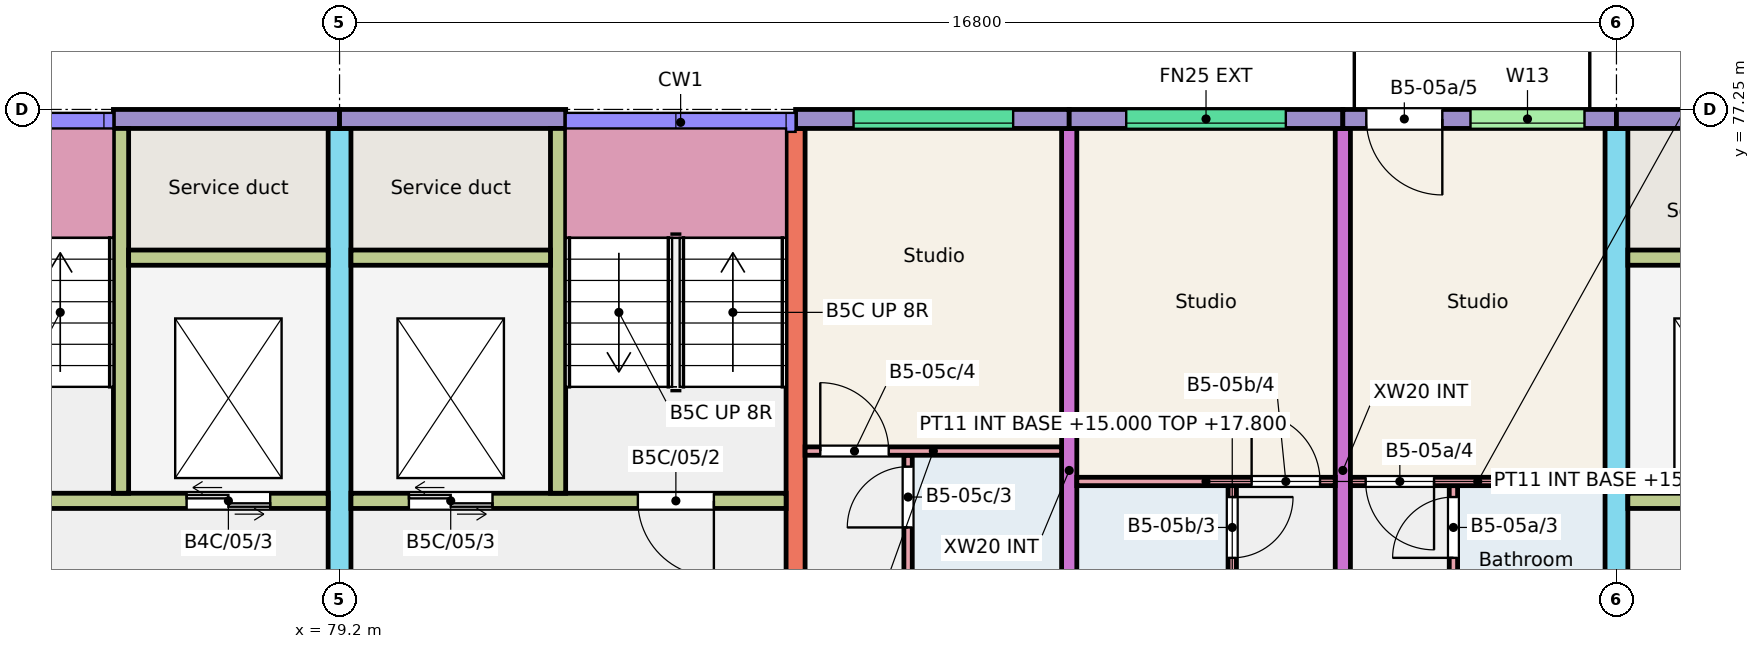
"""IFC4 building model, lengths in metres.
Left out: names, types, materials, properties, quantities, classifications, styles, units other than length and angle.
Written with IfcOpenShell. Run it as: python <this file> out.ifc"""

import sys

from ifc_helpers import new_model, si_unit, direction, frame, frame_2d, origin, place, context, subcontext, project, spatial, rectangle, extrude, element, fill, save


model = new_model("IFC4")
c1 = context("Model", 3, precision=1e-05, world=origin(), true_north=direction((0.0, 1.0)))
c2 = subcontext(c1, "Body", "Model", "MODEL_VIEW")
j1 = project(units=[si_unit("LENGTHUNIT", "METRE"), si_unit("PLANEANGLEUNIT", "RADIAN")], contexts=[c1])
p1 = place(None, origin())
s1 = spatial("IfcSite", under=j1, at=p1, CompositionType="ELEMENT")
p2 = place(p1, origin())
s2 = spatial("IfcBuilding", under=s1, at=p2, CompositionType="ELEMENT")
p3 = place(p2, frame((0.0, 0.0, 15.0)))
s3 = spatial("IfcBuildingStorey", under=s2, at=p3, CompositionType="ELEMENT", Elevation=15.0)
p4 = place(p3, frame((79.2, 66.0, 0.0), z_axis=(0.0, 0.0, 1.0), x_axis=(0.0, 1.0, 0.0)))
e1 = element("IfcWall", 1, at=p4, inside=s3, PredefinedType="SHEAR", context=c2, shape_type="SweptSolid", body=[
    extrude(rectangle(XDim=11.0, YDim=0.3, at=frame_2d((5.5, 0.0))), origin(), (0.0, 0.0, 1.0), 3.0),
])
p5 = place(p4, frame((0.3, 0.0, 0.0)))
e2 = element("IfcOpeningElement", 2, at=p5, cuts=e1, PredefinedType="OPENING", context=c2, shape_type="SweptSolid", body=[
    extrude(rectangle(XDim=1.2, YDim=2.1, at=frame_2d((0.6, 1.05))), frame((0.0, 0.16, 0.0), z_axis=(0.0, -1.0, 0.0), x_axis=(1.0, 0.0, 0.0)), (0.0, 0.0, 1.0), 0.32),
])
p6 = place(p3, frame((85.2, 68.0, 0.0), z_axis=(0.0, 0.0, 1.0), x_axis=(0.0, 1.0, 0.0)))
e3 = element("IfcWall", 3, at=p6, inside=s3, PredefinedType="SHEAR", context=c2, shape_type="SweptSolid", body=[
    extrude(rectangle(XDim=9.0, YDim=0.25, at=frame_2d((4.5, 0.0))), origin(), (0.0, 0.0, 1.0), 3.0),
])
for number, where, z_axis, x_axis in (
    (4, (88.8, 68.0, 0.0), (0.0, 0.0, 1.0), (0.0, 1.0, 0.0)),
    (5, (92.4, 68.0, 0.0), (0.0, 0.0, 1.0), (0.0, 1.0, 0.0)),
):
    element("IfcWall", number, at=place(p3, frame(where, z_axis=z_axis, x_axis=x_axis)), inside=s3, PredefinedType="SHEAR", context=c2, shape_type="SweptSolid", body=[
        extrude(rectangle(XDim=9.0, YDim=0.2, at=frame_2d((4.5, 0.0))), origin(), (0.0, 0.0, 1.0), 3.0),
    ])
p7 = place(p3, frame((96.0, 66.0, 0.0), z_axis=(0.0, 0.0, 1.0), x_axis=(0.0, 1.0, 0.0)))
e6 = element("IfcWall", 6, at=p7, inside=s3, PredefinedType="SHEAR", context=c2, shape_type="SweptSolid", body=[
    extrude(rectangle(XDim=11.0, YDim=0.3, at=frame_2d((5.5, 0.0))), origin(), (0.0, 0.0, 1.0), 3.0),
])
p8 = place(p7, frame((0.3, 0.0, 0.0)))
e7 = element("IfcOpeningElement", 7, at=p8, cuts=e6, PredefinedType="OPENING", context=c2, shape_type="SweptSolid", body=[
    extrude(rectangle(XDim=1.2, YDim=2.1, at=frame_2d((0.6, 1.05))), frame((0.0, 0.16, 0.0), z_axis=(0.0, -1.0, 0.0), x_axis=(1.0, 0.0, 0.0)), (0.0, 0.0, 1.0), 0.32),
])
p9 = place(p3, frame((76.225, 77.125, 0.0), z_axis=(0.0, 0.0, 1.0), x_axis=(1.0, 0.0, 0.0)))
e8 = element("IfcWall", 8, at=p9, inside=s3, PredefinedType="SOLIDWALL", context=c2, shape_type="SweptSolid", body=[
    extrude(rectangle(XDim=2.975, YDim=0.25, at=frame_2d((1.487, 0.0))), origin(), (0.0, 0.0, 1.0), 3.0),
])
p10 = place(p3, frame((73.325, 72.1, 0.0), z_axis=(0.0, 0.0, 1.0), x_axis=(1.0, 0.0, 0.0)))
e9 = element("IfcWall", 9, at=p10, inside=s3, PredefinedType="SHEAR", context=c2, shape_type="SweptSolid", body=[
    extrude(rectangle(XDim=5.725, YDim=0.2, at=frame_2d((2.863, 0.0))), origin(), (0.0, 0.0, 1.0), 3.0),
])
p11 = place(p10, frame((0.95, 0.0, 0.0)))
e10 = element("IfcOpeningElement", 10, at=p11, cuts=e9, PredefinedType="OPENING", context=c2, shape_type="SweptSolid", body=[
    extrude(rectangle(XDim=1.0, YDim=2.1, at=frame_2d((0.5, 1.05))), frame((0.0, 0.11, 0.0), z_axis=(0.0, -1.0, 0.0), x_axis=(1.0, 0.0, 0.0)), (0.0, 0.0, 1.0), 0.22),
])
p12 = place(p10, frame((3.863, 0.0, 0.0)))
e11 = element("IfcOpeningElement", 11, at=p12, cuts=e9, PredefinedType="OPENING", context=c2, shape_type="SweptSolid", body=[
    extrude(rectangle(XDim=1.1, YDim=2.1, at=frame_2d((0.55, 1.05))), frame((0.0, 0.11, 0.0), z_axis=(0.0, -1.0, 0.0), x_axis=(1.0, 0.0, 0.0)), (0.0, 0.0, 1.0), 0.22),
])
p13 = place(p3, frame((76.325, 72.2, 0.0), z_axis=(0.0, 0.0, 1.0), x_axis=(0.0, 1.0, 0.0)))
e12 = element("IfcWall", 12, at=p13, inside=s3, PredefinedType="SHEAR", context=c2, shape_type="SweptSolid", body=[
    extrude(rectangle(XDim=4.8, YDim=0.2, at=frame_2d((2.4, 0.0))), origin(), (0.0, 0.0, 1.0), 3.0),
])
p14 = place(p3, frame((76.425, 75.3, 0.0), z_axis=(0.0, 0.0, 1.0), x_axis=(1.0, 0.0, 0.0)))
e13 = element("IfcWall", 13, at=p14, inside=s3, PredefinedType="SHEAR", context=c2, shape_type="SweptSolid", body=[
    extrude(rectangle(XDim=2.625, YDim=0.2, at=frame_2d((1.312, 0.0))), origin(), (0.0, 0.0, 1.0), 3.0),
])
p15 = place(p3, frame((79.2, 77.125, 0.0), z_axis=(0.0, 0.0, 1.0), x_axis=(1.0, 0.0, 0.0)))
e14 = element("IfcWall", 14, at=p15, inside=s3, PredefinedType="SOLIDWALL", context=c2, shape_type="SweptSolid", body=[
    extrude(rectangle(XDim=2.975, YDim=0.25, at=frame_2d((1.488, 0.0))), origin(), (0.0, 0.0, 1.0), 3.0),
])
p16 = place(p3, frame((79.35, 72.1, 0.0), z_axis=(0.0, 0.0, 1.0), x_axis=(1.0, 0.0, 0.0)))
e15 = element("IfcWall", 15, at=p16, inside=s3, PredefinedType="SHEAR", context=c2, shape_type="SweptSolid", body=[
    extrude(rectangle(XDim=5.725, YDim=0.2, at=frame_2d((2.862, 0.0))), origin(), (0.0, 0.0, 1.0), 3.0),
])
p17 = place(p16, frame((3.775, 0.0, 0.0)))
e16 = element("IfcOpeningElement", 16, at=p17, cuts=e15, PredefinedType="OPENING", context=c2, shape_type="SweptSolid", body=[
    extrude(rectangle(XDim=1.0, YDim=2.1, at=frame_2d((0.5, 1.05))), frame((0.0, 0.11, 0.0), z_axis=(0.0, -1.0, 0.0), x_axis=(1.0, 0.0, 0.0)), (0.0, 0.0, 1.0), 0.22),
])
p18 = place(p16, frame((0.762, 0.0, 0.0)))
e17 = element("IfcOpeningElement", 17, at=p18, cuts=e15, PredefinedType="OPENING", context=c2, shape_type="SweptSolid", body=[
    extrude(rectangle(XDim=1.1, YDim=2.1, at=frame_2d((0.55, 1.05))), frame((0.0, 0.11, 0.0), z_axis=(0.0, -1.0, 0.0), x_axis=(1.0, 0.0, 0.0)), (0.0, 0.0, 1.0), 0.22),
])
p19 = place(p3, frame((82.075, 72.2, 0.0), z_axis=(0.0, 0.0, 1.0), x_axis=(0.0, 1.0, 0.0)))
e18 = element("IfcWall", 18, at=p19, inside=s3, PredefinedType="SHEAR", context=c2, shape_type="SweptSolid", body=[
    extrude(rectangle(XDim=4.8, YDim=0.2, at=frame_2d((2.4, 0.0))), origin(), (0.0, 0.0, 1.0), 3.0),
])
p20 = place(p3, frame((79.35, 75.3, 0.0), z_axis=(0.0, 0.0, 1.0), x_axis=(1.0, 0.0, 0.0)))
e19 = element("IfcWall", 19, at=p20, inside=s3, PredefinedType="SHEAR", context=c2, shape_type="SweptSolid", body=[
    extrude(rectangle(XDim=2.625, YDim=0.2, at=frame_2d((1.312, 0.0))), origin(), (0.0, 0.0, 1.0), 3.0),
])
p21 = place(p3, frame((85.2, 77.125, 0.0), z_axis=(0.0, 0.0, 1.0), x_axis=(1.0, 0.0, 0.0)))
e20 = element("IfcWall", 20, at=p21, inside=s3, PredefinedType="SOLIDWALL", context=c2, shape_type="SweptSolid", body=[
    extrude(rectangle(XDim=3.6, YDim=0.25, at=frame_2d((1.8, 0.0))), origin(), (0.0, 0.0, 1.0), 3.0),
])
p22 = place(p21, frame((0.762, 0.0, 1.2)))
e21 = element("IfcOpeningElement", 21, at=p22, cuts=e20, PredefinedType="OPENING", context=c2, shape_type="SweptSolid", body=[
    extrude(rectangle(XDim=2.1, YDim=1.2, at=frame_2d((1.05, 0.6))), frame((0.0, 0.135, 0.0), z_axis=(0.0, -1.0, 0.0), x_axis=(1.0, 0.0, 0.0)), (0.0, 0.0, 1.0), 0.27),
])
p23 = place(p3, frame((88.8, 77.125, 0.0), z_axis=(0.0, 0.0, 1.0), x_axis=(1.0, 0.0, 0.0)))
e22 = element("IfcWall", 22, at=p23, inside=s3, PredefinedType="SOLIDWALL", context=c2, shape_type="SweptSolid", body=[
    extrude(rectangle(XDim=3.6, YDim=0.25, at=frame_2d((1.8, 0.0))), origin(), (0.0, 0.0, 1.0), 3.0),
])
p24 = place(p23, frame((0.75, 0.0, 1.2)))
e23 = element("IfcOpeningElement", 23, at=p24, cuts=e22, PredefinedType="OPENING", context=c2, shape_type="SweptSolid", body=[
    extrude(rectangle(XDim=2.1, YDim=1.2, at=frame_2d((1.05, 0.6))), frame((0.0, 0.135, 0.0), z_axis=(0.0, -1.0, 0.0), x_axis=(1.0, 0.0, 0.0)), (0.0, 0.0, 1.0), 0.27),
])
p25 = place(p3, frame((92.4, 77.125, 0.0), z_axis=(0.0, 0.0, 1.0), x_axis=(1.0, 0.0, 0.0)))
e24 = element("IfcWall", 24, at=p25, inside=s3, PredefinedType="SOLIDWALL", context=c2, shape_type="SweptSolid", body=[
    extrude(rectangle(XDim=3.6, YDim=0.25, at=frame_2d((1.8, 0.0))), origin(), (0.0, 0.0, 1.0), 3.0),
])
p26 = place(p25, frame((1.679, 0.0, 1.2)))
e25 = element("IfcOpeningElement", 25, at=p26, cuts=e24, PredefinedType="OPENING", context=c2, shape_type="SweptSolid", body=[
    extrude(rectangle(XDim=1.5, YDim=1.2, at=frame_2d((0.75, 0.6))), frame((0.0, 0.135, 0.0), z_axis=(0.0, -1.0, 0.0), x_axis=(1.0, 0.0, 0.0)), (0.0, 0.0, 1.0), 0.27),
])
p27 = place(p25, frame((0.309, 0.0, 0.0)))
e26 = element("IfcOpeningElement", 26, at=p27, cuts=e24, PredefinedType="OPENING", context=c2, shape_type="SweptSolid", body=[
    extrude(rectangle(XDim=1.0, YDim=2.1, at=frame_2d((0.5, 1.05))), frame((0.0, 0.135, 0.0), z_axis=(0.0, -1.0, 0.0), x_axis=(1.0, 0.0, 0.0)), (0.0, 0.0, 1.0), 0.27),
])
p28 = place(p3, frame((96.0, 77.125, 0.0), z_axis=(0.0, 0.0, 1.0), x_axis=(1.0, 0.0, 0.0)))
e27 = element("IfcWall", 27, at=p28, inside=s3, PredefinedType="SOLIDWALL", context=c2, shape_type="SweptSolid", body=[
    extrude(rectangle(XDim=2.975, YDim=0.25, at=frame_2d((1.488, 0.0))), origin(), (0.0, 0.0, 1.0), 3.0),
])
p29 = place(p3, frame((96.15, 72.1, 0.0), z_axis=(0.0, 0.0, 1.0), x_axis=(1.0, 0.0, 0.0)))
e28 = element("IfcWall", 28, at=p29, inside=s3, PredefinedType="SHEAR", context=c2, shape_type="SweptSolid", body=[
    extrude(rectangle(XDim=5.725, YDim=0.2, at=frame_2d((2.863, 0.0))), origin(), (0.0, 0.0, 1.0), 3.0),
])
p30 = place(p29, frame((3.775, 0.0, 0.0)))
e29 = element("IfcOpeningElement", 29, at=p30, cuts=e28, PredefinedType="OPENING", context=c2, shape_type="SweptSolid", body=[
    extrude(rectangle(XDim=1.0, YDim=2.1, at=frame_2d((0.5, 1.05))), frame((0.0, 0.11, 0.0), z_axis=(0.0, -1.0, 0.0), x_axis=(1.0, 0.0, 0.0)), (0.0, 0.0, 1.0), 0.22),
])
p31 = place(p29, frame((0.762, 0.0, 0.0)))
e30 = element("IfcOpeningElement", 30, at=p31, cuts=e28, PredefinedType="OPENING", context=c2, shape_type="SweptSolid", body=[
    extrude(rectangle(XDim=1.1, YDim=2.1, at=frame_2d((0.55, 1.05))), frame((0.0, 0.11, 0.0), z_axis=(0.0, -1.0, 0.0), x_axis=(1.0, 0.0, 0.0)), (0.0, 0.0, 1.0), 0.22),
])
p32 = place(p3, frame((96.15, 75.3, 0.0), z_axis=(0.0, 0.0, 1.0), x_axis=(1.0, 0.0, 0.0)))
e31 = element("IfcWall", 31, at=p32, inside=s3, PredefinedType="SHEAR", context=c2, shape_type="SweptSolid", body=[
    extrude(rectangle(XDim=2.625, YDim=0.2, at=frame_2d((1.312, 0.0))), origin(), (0.0, 0.0, 1.0), 3.0),
])
p33 = place(p3, frame((93.855, 68.0, 0.0), z_axis=(0.0, 0.0, 1.0), x_axis=(0.0, 1.0, 0.0)))
e32 = element("IfcWall", 32, at=p33, inside=s3, PredefinedType="PARTITIONING", context=c2, shape_type="SweptSolid", body=[
    extrude(rectangle(XDim=4.3, YDim=0.11, at=frame_2d((2.15, 0.0))), origin(), (0.0, 0.0, 1.0), 2.8),
])
p34 = place(p33, frame((0.2, 0.0, 0.0)))
e33 = element("IfcOpeningElement", 33, at=p34, cuts=e32, PredefinedType="OPENING", context=c2, shape_type="SweptSolid", body=[
    extrude(rectangle(XDim=0.8, YDim=2.1, at=frame_2d((0.4, 1.05))), frame((0.0, 0.065, 0.0), z_axis=(0.0, -1.0, 0.0), x_axis=(1.0, 0.0, 0.0)), (0.0, 0.0, 1.0), 0.13),
])
p35 = place(p33, frame((3.35, 0.0, 0.0)))
e34 = element("IfcOpeningElement", 34, at=p35, cuts=e32, PredefinedType="OPENING", context=c2, shape_type="SweptSolid", body=[
    extrude(rectangle(XDim=0.8, YDim=2.1, at=frame_2d((0.4, 1.05))), frame((0.0, 0.065, 0.0), z_axis=(0.0, -1.0, 0.0), x_axis=(1.0, 0.0, 0.0)), (0.0, 0.0, 1.0), 0.13),
])
p36 = place(p3, frame((92.5, 72.355, 0.0), z_axis=(0.0, 0.0, 1.0), x_axis=(1.0, 0.0, 0.0)))
e35 = element("IfcWall", 35, at=p36, inside=s3, PredefinedType="PARTITIONING", context=c2, shape_type="SweptSolid", body=[
    extrude(rectangle(XDim=3.35, YDim=0.11, at=frame_2d((1.675, 0.0))), origin(), (0.0, 0.0, 1.0), 2.8),
])
p37 = place(p36, frame((0.2, 0.0, 0.0)))
e36 = element("IfcOpeningElement", 36, at=p37, cuts=e35, PredefinedType="OPENING", context=c2, shape_type="SweptSolid", body=[
    extrude(rectangle(XDim=0.9, YDim=2.1, at=frame_2d((0.45, 1.05))), frame((0.0, 0.065, 0.0), z_axis=(0.0, -1.0, 0.0), x_axis=(1.0, 0.0, 0.0)), (0.0, 0.0, 1.0), 0.13),
])
p38 = place(p3, frame((90.945, 68.0, 0.0), z_axis=(0.0, 0.0, 1.0), x_axis=(0.0, 1.0, 0.0)))
e37 = element("IfcWall", 37, at=p38, inside=s3, PredefinedType="PARTITIONING", context=c2, shape_type="SweptSolid", body=[
    extrude(rectangle(XDim=4.3, YDim=0.11, at=frame_2d((2.15, 0.0))), origin(), (0.0, 0.0, 1.0), 2.8),
])
p39 = place(p38, frame((0.2, 0.0, 0.0)))
e38 = element("IfcOpeningElement", 38, at=p39, cuts=e37, PredefinedType="OPENING", context=c2, shape_type="SweptSolid", body=[
    extrude(rectangle(XDim=0.8, YDim=2.1, at=frame_2d((0.4, 1.05))), frame((0.0, 0.065, 0.0), z_axis=(0.0, -1.0, 0.0), x_axis=(1.0, 0.0, 0.0)), (0.0, 0.0, 1.0), 0.13),
])
p40 = place(p38, frame((3.35, 0.0, 0.0)))
e39 = element("IfcOpeningElement", 39, at=p40, cuts=e37, PredefinedType="OPENING", context=c2, shape_type="SweptSolid", body=[
    extrude(rectangle(XDim=0.8, YDim=2.1, at=frame_2d((0.4, 1.05))), frame((0.0, 0.065, 0.0), z_axis=(0.0, -1.0, 0.0), x_axis=(1.0, 0.0, 0.0)), (0.0, 0.0, 1.0), 0.13),
])
p41 = place(p3, frame((88.9, 72.355, 0.0), z_axis=(0.0, 0.0, 1.0), x_axis=(1.0, 0.0, 0.0)))
e40 = element("IfcWall", 40, at=p41, inside=s3, PredefinedType="PARTITIONING", context=c2, shape_type="SweptSolid", body=[
    extrude(rectangle(XDim=3.4, YDim=0.11, at=frame_2d((1.7, 0.0))), origin(), (0.0, 0.0, 1.0), 2.8),
])
p42 = place(p41, frame((2.3, 0.0, 0.0)))
e41 = element("IfcOpeningElement", 41, at=p42, cuts=e40, PredefinedType="OPENING", context=c2, shape_type="SweptSolid", body=[
    extrude(rectangle(XDim=0.9, YDim=2.1, at=frame_2d((0.45, 1.05))), frame((0.0, 0.065, 0.0), z_axis=(0.0, -1.0, 0.0), x_axis=(1.0, 0.0, 0.0)), (0.0, 0.0, 1.0), 0.13),
])
p43 = place(p3, frame((86.68, 68.0, 0.0), z_axis=(0.0, 0.0, 1.0), x_axis=(0.0, 1.0, 0.0)))
e42 = element("IfcWall", 42, at=p43, inside=s3, PredefinedType="PARTITIONING", context=c2, shape_type="SweptSolid", body=[
    extrude(rectangle(XDim=4.7, YDim=0.11, at=frame_2d((2.35, 0.0))), origin(), (0.0, 0.0, 1.0), 2.8),
])
p44 = place(p43, frame((0.2, 0.0, 0.0)))
e43 = element("IfcOpeningElement", 43, at=p44, cuts=e42, PredefinedType="OPENING", context=c2, shape_type="SweptSolid", body=[
    extrude(rectangle(XDim=0.8, YDim=2.1, at=frame_2d((0.4, 1.05))), frame((0.0, 0.065, 0.0), z_axis=(0.0, -1.0, 0.0), x_axis=(1.0, 0.0, 0.0)), (0.0, 0.0, 1.0), 0.13),
])
p45 = place(p43, frame((3.75, 0.0, 0.0)))
e44 = element("IfcOpeningElement", 44, at=p45, cuts=e42, PredefinedType="OPENING", context=c2, shape_type="SweptSolid", body=[
    extrude(rectangle(XDim=0.8, YDim=2.1, at=frame_2d((0.4, 1.05))), frame((0.0, 0.065, 0.0), z_axis=(0.0, -1.0, 0.0), x_axis=(1.0, 0.0, 0.0)), (0.0, 0.0, 1.0), 0.13),
])
p46 = place(p3, frame((85.325, 72.755, 0.0), z_axis=(0.0, 0.0, 1.0), x_axis=(1.0, 0.0, 0.0)))
e45 = element("IfcWall", 45, at=p46, inside=s3, PredefinedType="PARTITIONING", context=c2, shape_type="SweptSolid", body=[
    extrude(rectangle(XDim=3.375, YDim=0.11, at=frame_2d((1.688, 0.0))), origin(), (0.0, 0.0, 1.0), 2.8),
])
p47 = place(p46, frame((0.2, 0.0, 0.0)))
e46 = element("IfcOpeningElement", 46, at=p47, cuts=e45, PredefinedType="OPENING", context=c2, shape_type="SweptSolid", body=[
    extrude(rectangle(XDim=0.9, YDim=2.1, at=frame_2d((0.45, 1.05))), frame((0.0, 0.065, 0.0), z_axis=(0.0, -1.0, 0.0), x_axis=(1.0, 0.0, 0.0)), (0.0, 0.0, 1.0), 0.13),
])
p48 = place(p26, origin())
e47 = element("IfcWindow", 47, at=p48, inside=s3, PartitioningType="SINGLE_PANEL", PredefinedType="WINDOW", context=c2, shape_type="SweptSolid", body=[
    extrude(rectangle(XDim=1.5, YDim=1.2, at=frame_2d((0.75, 0.6))), frame((0.0, -0.025, 0.0), z_axis=(0.0, -1.0, 0.0), x_axis=(1.0, 0.0, 0.0)), (0.0, 0.0, 1.0), 0.06),
])
fill(e25, e47)
p49 = place(p24, origin())
e48 = element("IfcWindow", 48, at=p49, inside=s3, PartitioningType="SINGLE_PANEL", PredefinedType="WINDOW", context=c2, shape_type="SweptSolid", body=[
    extrude(rectangle(XDim=2.1, YDim=1.2, at=frame_2d((1.05, 0.6))), frame((0.0, -0.025, 0.0), z_axis=(0.0, -1.0, 0.0), x_axis=(1.0, 0.0, 0.0)), (0.0, 0.0, 1.0), 0.06),
])
fill(e23, e48)
p50 = place(p22, origin())
e49 = element("IfcWindow", 49, at=p50, inside=s3, PartitioningType="SINGLE_PANEL", PredefinedType="WINDOW", context=c2, shape_type="SweptSolid", body=[
    extrude(rectangle(XDim=2.1, YDim=1.2, at=frame_2d((1.05, 0.6))), frame((0.0, -0.025, 0.0), z_axis=(0.0, -1.0, 0.0), x_axis=(1.0, 0.0, 0.0)), (0.0, 0.0, 1.0), 0.06),
])
fill(e21, e49)
p51 = place(p35, origin())
e50 = element("IfcDoor", 50, at=p51, inside=s3, OperationType="SINGLE_SWING_LEFT", PredefinedType="DOOR", context=c2, shape_type="SweptSolid", body=[
    extrude(rectangle(XDim=0.8, YDim=2.1, at=frame_2d((0.4, 1.05))), frame((0.0, 0.025, 0.0), z_axis=(0.0, -1.0, 0.0), x_axis=(1.0, 0.0, 0.0)), (0.0, 0.0, 1.0), 0.05),
])
fill(e34, e50)
p52 = place(p37, origin())
e51 = element("IfcDoor", 51, at=p52, inside=s3, OperationType="SINGLE_SWING_RIGHT", PredefinedType="DOOR", context=c2, shape_type="SweptSolid", body=[
    extrude(rectangle(XDim=0.9, YDim=2.1, at=frame_2d((0.45, 1.05))), frame((0.0, 0.025, 0.0), z_axis=(0.0, -1.0, 0.0), x_axis=(1.0, 0.0, 0.0)), (0.0, 0.0, 1.0), 0.05),
])
fill(e36, e51)
p53 = place(p27, origin())
e52 = element("IfcDoor", 52, at=p53, inside=s3, OperationType="SINGLE_SWING_RIGHT", PredefinedType="DOOR", context=c2, shape_type="SweptSolid", body=[
    extrude(rectangle(XDim=1.0, YDim=2.1, at=frame_2d((0.5, 1.05))), frame((0.0, 0.025, 0.0), z_axis=(0.0, -1.0, 0.0), x_axis=(1.0, 0.0, 0.0)), (0.0, 0.0, 1.0), 0.05),
])
fill(e26, e52)
p54 = place(p40, origin())
e53 = element("IfcDoor", 53, at=p54, inside=s3, OperationType="SINGLE_SWING_RIGHT", PredefinedType="DOOR", context=c2, shape_type="SweptSolid", body=[
    extrude(rectangle(XDim=0.8, YDim=2.1, at=frame_2d((0.4, 1.05))), frame((0.0, 0.025, 0.0), z_axis=(0.0, -1.0, 0.0), x_axis=(1.0, 0.0, 0.0)), (0.0, 0.0, 1.0), 0.05),
])
fill(e39, e53)
p55 = place(p42, origin())
e54 = element("IfcDoor", 54, at=p55, inside=s3, OperationType="SINGLE_SWING_LEFT", PredefinedType="DOOR", context=c2, shape_type="SweptSolid", body=[
    extrude(rectangle(XDim=0.9, YDim=2.1, at=frame_2d((0.45, 1.05))), frame((0.0, 0.025, 0.0), z_axis=(0.0, -1.0, 0.0), x_axis=(1.0, 0.0, 0.0)), (0.0, 0.0, 1.0), 0.05),
])
fill(e41, e54)
p56 = place(p45, origin())
e55 = element("IfcDoor", 55, at=p56, inside=s3, OperationType="SINGLE_SWING_LEFT", PredefinedType="DOOR", context=c2, shape_type="SweptSolid", body=[
    extrude(rectangle(XDim=0.8, YDim=2.1, at=frame_2d((0.4, 1.05))), frame((0.0, 0.025, 0.0), z_axis=(0.0, -1.0, 0.0), x_axis=(1.0, 0.0, 0.0)), (0.0, 0.0, 1.0), 0.05),
])
fill(e44, e55)
p57 = place(p47, origin())
e56 = element("IfcDoor", 56, at=p57, inside=s3, OperationType="SINGLE_SWING_LEFT", PredefinedType="DOOR", context=c2, shape_type="SweptSolid", body=[
    extrude(rectangle(XDim=0.9, YDim=2.1, at=frame_2d((0.45, 1.05))), frame((0.0, 0.025, 0.0), z_axis=(0.0, -1.0, 0.0), x_axis=(1.0, 0.0, 0.0)), (0.0, 0.0, 1.0), 0.05),
])
fill(e46, e56)
p58 = place(p12, origin())
e57 = element("IfcDoor", 57, at=p58, inside=s3, OperationType="DOUBLE_DOOR_SLIDING", PredefinedType="DOOR", context=c2, shape_type="SweptSolid", body=[
    extrude(rectangle(XDim=1.1, YDim=2.1, at=frame_2d((0.55, 1.05))), frame((0.0, 0.025, 0.0), z_axis=(0.0, -1.0, 0.0), x_axis=(1.0, 0.0, 0.0)), (0.0, 0.0, 1.0), 0.05),
])
fill(e11, e57)
p59 = place(p17, origin())
e58 = element("IfcDoor", 58, at=p59, inside=s3, OperationType="SINGLE_SWING_RIGHT", PredefinedType="DOOR", context=c2, shape_type="SweptSolid", body=[
    extrude(rectangle(XDim=1.0, YDim=2.1, at=frame_2d((0.5, 1.05))), frame((0.0, 0.025, 0.0), z_axis=(0.0, -1.0, 0.0), x_axis=(1.0, 0.0, 0.0)), (0.0, 0.0, 1.0), 0.05),
])
fill(e16, e58)
p60 = place(p18, origin())
e59 = element("IfcDoor", 59, at=p60, inside=s3, OperationType="DOUBLE_DOOR_SLIDING", PredefinedType="DOOR", context=c2, shape_type="SweptSolid", body=[
    extrude(rectangle(XDim=1.1, YDim=2.1, at=frame_2d((0.55, 1.05))), frame((0.0, 0.025, 0.0), z_axis=(0.0, -1.0, 0.0), x_axis=(1.0, 0.0, 0.0)), (0.0, 0.0, 1.0), 0.05),
])
fill(e17, e59)
save(model, sys.argv[1])
